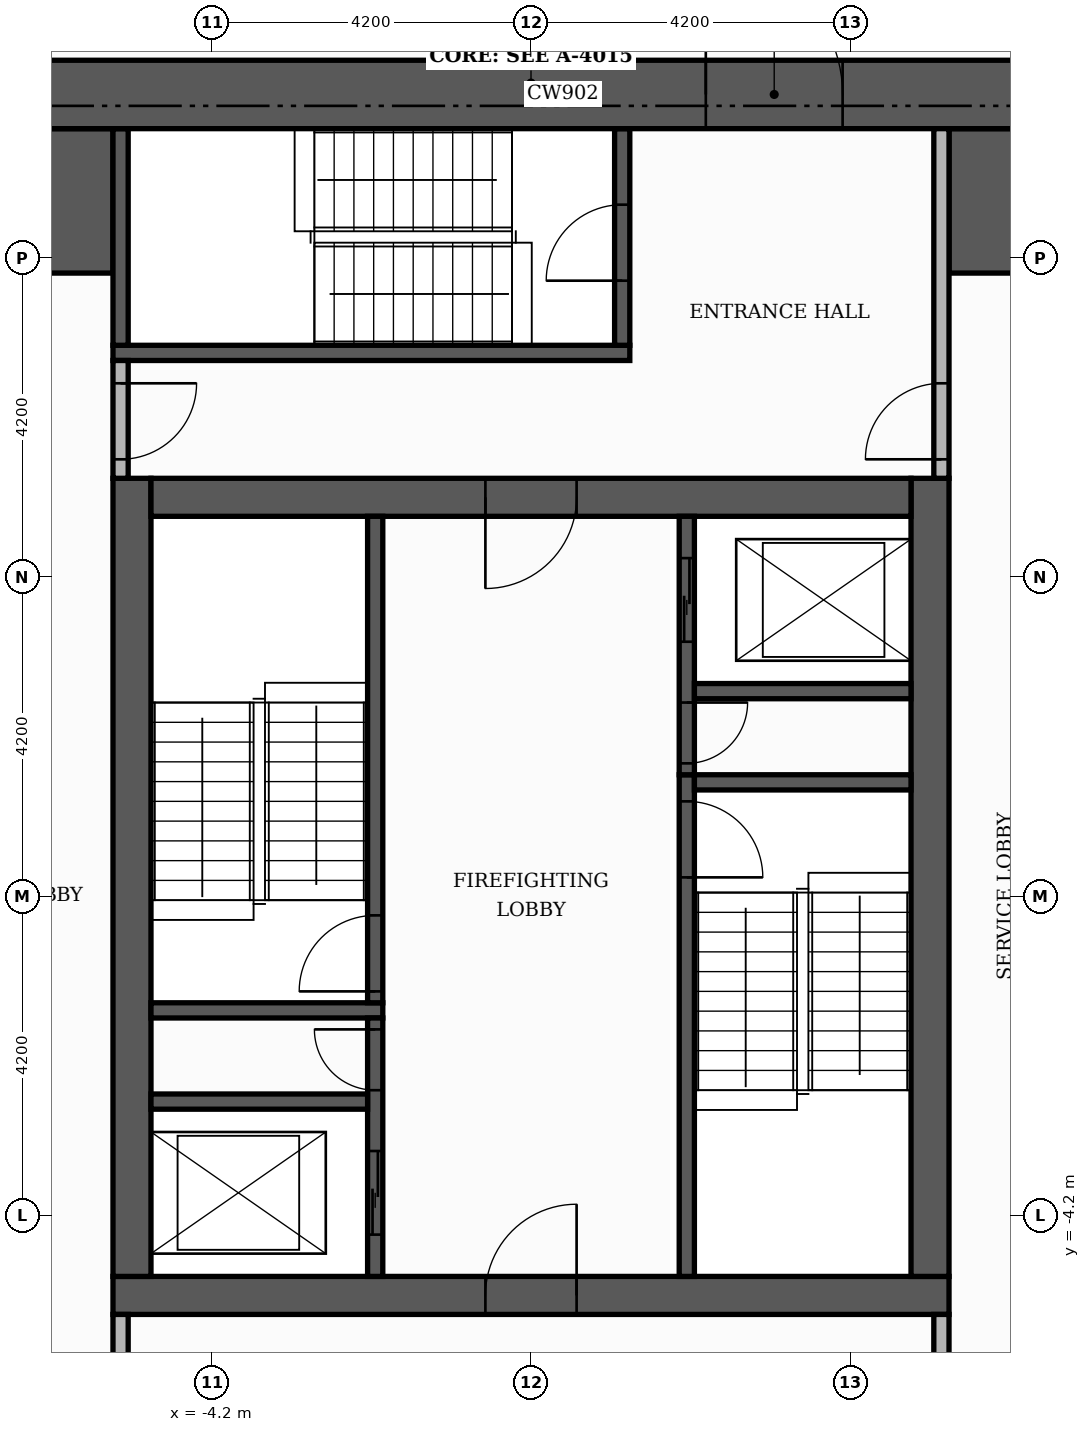
"""IFC4 building model, lengths in metres.
Left out: names, types, materials, properties, quantities, classifications, styles, units other than length and angle.
Written with IfcOpenShell. Run it as: python <this file> out.ifc"""

import sys

from ifc_helpers import new_model, si_unit, direction, frame, frame_2d, origin, place, context, subcontext, project, spatial, rectangle, extrude, element, fill, save


model = new_model("IFC4")
c1 = context("Model", 3, precision=1e-05, world=origin(), true_north=direction((0.0, 1.0)))
c2 = subcontext(c1, "Body", "Model", "MODEL_VIEW")
j1 = project(units=[si_unit("LENGTHUNIT", "METRE"), si_unit("PLANEANGLEUNIT", "RADIAN")], contexts=[c1])
p1 = place(None, origin())
s1 = spatial("IfcSite", under=j1, at=p1, CompositionType="ELEMENT")
p2 = place(p1, origin())
s2 = spatial("IfcBuilding", under=s1, at=p2, CompositionType="ELEMENT")
p3 = place(p2, frame((0.0, 0.0, 94.8)))
s3 = spatial("IfcBuildingStorey", under=s2, at=p3, CompositionType="ELEMENT", Elevation=94.8)
p4 = place(p3, frame((-5.5, -5.25, 0.0), z_axis=(0.0, 0.0, 1.0), x_axis=(1.0, 0.0, 0.0)))
e1 = element("IfcWall", 1, at=p4, inside=s3, PredefinedType="SHEAR", context=c2, shape_type="SweptSolid", body=[
    extrude(rectangle(XDim=11.0, YDim=0.5, at=frame_2d((5.5, 0.0))), origin(), (0.0, 0.0, 1.0), 3.48),
])
p5 = place(p4, frame((4.9, 0.0, 0.0)))
e2 = element("IfcOpeningElement", 2, at=p5, cuts=e1, PredefinedType="OPENING", context=c2, shape_type="SweptSolid", body=[
    extrude(rectangle(XDim=1.2, YDim=2.1, at=frame_2d((0.6, 1.05))), frame((0.0, 0.26, 0.0), z_axis=(0.0, -1.0, 0.0), x_axis=(1.0, 0.0, 0.0)), (0.0, 0.0, 1.0), 0.52),
])
for number, where, z_axis, x_axis in (
    (3, (-5.25, -5.0, 0.0), (0.0, 0.0, 1.0), (0.0, 1.0, 0.0)),
    (4, (5.25, -5.0, 0.0), (0.0, 0.0, 1.0), (0.0, 1.0, 0.0)),
):
    element("IfcWall", number, at=place(p3, frame(where, z_axis=z_axis, x_axis=x_axis)), inside=s3, PredefinedType="SHEAR", context=c2, shape_type="SweptSolid", body=[
        extrude(rectangle(XDim=10.5, YDim=0.5, at=frame_2d((5.25, 0.0))), origin(), (0.0, 0.0, 1.0), 3.48),
    ])
p6 = place(p3, frame((-5.0, 5.25, 0.0), z_axis=(0.0, 0.0, 1.0), x_axis=(1.0, 0.0, 0.0)))
e5 = element("IfcWall", 5, at=p6, inside=s3, PredefinedType="SHEAR", context=c2, shape_type="SweptSolid", body=[
    extrude(rectangle(XDim=10.0, YDim=0.5, at=frame_2d((5.0, 0.0))), origin(), (0.0, 0.0, 1.0), 3.48),
])
p7 = place(p6, frame((4.4, 0.0, 0.0)))
e6 = element("IfcOpeningElement", 6, at=p7, cuts=e5, PredefinedType="OPENING", context=c2, shape_type="SweptSolid", body=[
    extrude(rectangle(XDim=1.2, YDim=2.1, at=frame_2d((0.6, 1.05))), frame((0.0, 0.26, 0.0), z_axis=(0.0, -1.0, 0.0), x_axis=(1.0, 0.0, 0.0)), (0.0, 0.0, 1.0), 0.52),
])
for number, where, z_axis, x_axis in (
    (7, (-10.1, 9.15, 0.0), (0.0, 0.0, 1.0), (1.0, 0.0, 0.0)),
    (8, (5.5, 9.15, 0.0), (0.0, 0.0, 1.0), (1.0, 0.0, 0.0)),
):
    element("IfcWall", number, at=place(p3, frame(where, z_axis=z_axis, x_axis=x_axis)), inside=s3, PredefinedType="SHEAR", context=c2, shape_type="SweptSolid", body=[
        extrude(rectangle(XDim=4.6, YDim=1.9, at=frame_2d((2.3, 0.0))), origin(), (0.0, 0.0, 1.0), 3.48),
    ])
p8 = place(p3, frame((2.05, -5.0, 0.0), z_axis=(0.0, 0.0, 1.0), x_axis=(0.0, 1.0, 0.0)))
e9 = element("IfcWall", 9, at=p8, inside=s3, PredefinedType="SHEAR", context=c2, shape_type="SweptSolid", body=[
    extrude(rectangle(XDim=6.6, YDim=0.2, at=frame_2d((3.3, 0.0))), origin(), (0.0, 0.0, 1.0), 3.48),
])
p9 = place(p8, frame((5.25, 0.0, 0.0)))
e10 = element("IfcOpeningElement", 10, at=p9, cuts=e9, PredefinedType="OPENING", context=c2, shape_type="SweptSolid", body=[
    extrude(rectangle(XDim=1.0, YDim=2.1, at=frame_2d((0.5, 1.05))), frame((0.0, 0.11, 0.0), z_axis=(0.0, -1.0, 0.0), x_axis=(1.0, 0.0, 0.0)), (0.0, 0.0, 1.0), 0.22),
])
p10 = place(p3, frame((-5.0, -1.5, 0.0), z_axis=(0.0, 0.0, 1.0), x_axis=(1.0, 0.0, 0.0)))
e11 = element("IfcWall", 11, at=p10, inside=s3, PredefinedType="SHEAR", context=c2, shape_type="SweptSolid", body=[
    extrude(rectangle(XDim=3.05, YDim=0.2, at=frame_2d((1.525, 0.0))), origin(), (0.0, 0.0, 1.0), 3.48),
])
p11 = place(p3, frame((-2.05, -1.4, 0.0), z_axis=(0.0, 0.0, 1.0), x_axis=(0.0, 1.0, 0.0)))
e12 = element("IfcWall", 12, at=p11, inside=s3, PredefinedType="SHEAR", context=c2, shape_type="SweptSolid", body=[
    extrude(rectangle(XDim=6.4, YDim=0.2, at=frame_2d((3.2, 0.0))), origin(), (0.0, 0.0, 1.0), 3.48),
])
p12 = place(p11, frame((0.15, 0.0, 0.0)))
e13 = element("IfcOpeningElement", 13, at=p12, cuts=e12, PredefinedType="OPENING", context=c2, shape_type="SweptSolid", body=[
    extrude(rectangle(XDim=1.0, YDim=2.1, at=frame_2d((0.5, 1.05))), frame((0.0, 0.11, 0.0), z_axis=(0.0, -1.0, 0.0), x_axis=(1.0, 0.0, 0.0)), (0.0, 0.0, 1.0), 0.22),
])
p13 = place(p3, frame((2.15, 1.5, 0.0), z_axis=(0.0, 0.0, 1.0), x_axis=(1.0, 0.0, 0.0)))
e14 = element("IfcWall", 14, at=p13, inside=s3, PredefinedType="SHEAR", context=c2, shape_type="SweptSolid", body=[
    extrude(rectangle(XDim=2.85, YDim=0.2, at=frame_2d((1.425, 0.0))), origin(), (0.0, 0.0, 1.0), 3.48),
])
p14 = place(p3, frame((-5.5, 7.15, 0.0), z_axis=(0.0, 0.0, 1.0), x_axis=(1.0, 0.0, 0.0)))
e15 = element("IfcWall", 15, at=p14, inside=s3, PredefinedType="SHEAR", context=c2, shape_type="SweptSolid", body=[
    extrude(rectangle(XDim=6.8, YDim=0.2, at=frame_2d((3.4, 0.0))), origin(), (0.0, 0.0, 1.0), 3.48),
])
p15 = place(p3, frame((-5.4, 7.25, 0.0), z_axis=(0.0, 0.0, 1.0), x_axis=(0.0, 1.0, 0.0)))
e16 = element("IfcWall", 16, at=p15, inside=s3, PredefinedType="SHEAR", context=c2, shape_type="SweptSolid", body=[
    extrude(rectangle(XDim=2.85, YDim=0.2, at=frame_2d((1.425, 0.0))), origin(), (0.0, 0.0, 1.0), 3.48),
])
p16 = place(p3, frame((1.2, 7.25, 0.0), z_axis=(0.0, 0.0, 1.0), x_axis=(0.0, 1.0, 0.0)))
e17 = element("IfcWall", 17, at=p16, inside=s3, PredefinedType="SHEAR", context=c2, shape_type="SweptSolid", body=[
    extrude(rectangle(XDim=2.85, YDim=0.2, at=frame_2d((1.425, 0.0))), origin(), (0.0, 0.0, 1.0), 3.48),
])
p17 = place(p16, frame((0.85, 0.0, 0.0)))
e18 = element("IfcOpeningElement", 18, at=p17, cuts=e17, PredefinedType="OPENING", context=c2, shape_type="SweptSolid", body=[
    extrude(rectangle(XDim=1.0, YDim=2.1, at=frame_2d((0.5, 1.05))), frame((0.0, 0.11, 0.0), z_axis=(0.0, -1.0, 0.0), x_axis=(1.0, 0.0, 0.0)), (0.0, 0.0, 1.0), 0.22),
])
p18 = place(p3, frame((-2.05, -5.0, 0.0), z_axis=(0.0, 0.0, 1.0), x_axis=(0.0, 1.0, 0.0)))
e19 = element("IfcWall", 19, at=p18, inside=s3, PredefinedType="SHEAR", context=c2, shape_type="SweptSolid", body=[
    extrude(rectangle(XDim=3.4, YDim=0.2, at=frame_2d((1.7, 0.0))), origin(), (0.0, 0.0, 1.0), 3.48),
])
p19 = place(p18, frame((0.55, 0.0, 0.0)))
e20 = element("IfcOpeningElement", 20, at=p19, cuts=e19, PredefinedType="OPENING", context=c2, shape_type="SweptSolid", body=[
    extrude(rectangle(XDim=1.1, YDim=2.1, at=frame_2d((0.55, 1.05))), frame((0.0, 0.11, 0.0), z_axis=(0.0, -1.0, 0.0), x_axis=(1.0, 0.0, 0.0)), (0.0, 0.0, 1.0), 0.22),
])
p20 = place(p18, frame((2.45, 0.0, 0.0)))
e21 = element("IfcOpeningElement", 21, at=p20, cuts=e19, PredefinedType="OPENING", context=c2, shape_type="SweptSolid", body=[
    extrude(rectangle(XDim=0.8, YDim=2.1, at=frame_2d((0.4, 1.05))), frame((0.0, 0.11, 0.0), z_axis=(0.0, -1.0, 0.0), x_axis=(1.0, 0.0, 0.0)), (0.0, 0.0, 1.0), 0.22),
])
p21 = place(p3, frame((-5.0, -2.7, 0.0), z_axis=(0.0, 0.0, 1.0), x_axis=(1.0, 0.0, 0.0)))
e22 = element("IfcWall", 22, at=p21, inside=s3, PredefinedType="SHEAR", context=c2, shape_type="SweptSolid", body=[
    extrude(rectangle(XDim=2.85, YDim=0.2, at=frame_2d((1.425, 0.0))), origin(), (0.0, 0.0, 1.0), 3.48),
])
p22 = place(p3, frame((2.05, 1.6, 0.0), z_axis=(0.0, 0.0, 1.0), x_axis=(0.0, 1.0, 0.0)))
e23 = element("IfcWall", 23, at=p22, inside=s3, PredefinedType="SHEAR", context=c2, shape_type="SweptSolid", body=[
    extrude(rectangle(XDim=3.4, YDim=0.2, at=frame_2d((1.7, 0.0))), origin(), (0.0, 0.0, 1.0), 3.48),
])
p23 = place(p22, frame((1.75, 0.0, 0.0)))
e24 = element("IfcOpeningElement", 24, at=p23, cuts=e23, PredefinedType="OPENING", context=c2, shape_type="SweptSolid", body=[
    extrude(rectangle(XDim=1.1, YDim=2.1, at=frame_2d((0.55, 1.05))), frame((0.0, 0.11, 0.0), z_axis=(0.0, -1.0, 0.0), x_axis=(1.0, 0.0, 0.0)), (0.0, 0.0, 1.0), 0.22),
])
p24 = place(p22, frame((0.15, 0.0, 0.0)))
e25 = element("IfcOpeningElement", 25, at=p24, cuts=e23, PredefinedType="OPENING", context=c2, shape_type="SweptSolid", body=[
    extrude(rectangle(XDim=0.8, YDim=2.1, at=frame_2d((0.4, 1.05))), frame((0.0, 0.11, 0.0), z_axis=(0.0, -1.0, 0.0), x_axis=(1.0, 0.0, 0.0)), (0.0, 0.0, 1.0), 0.22),
])
p25 = place(p3, frame((2.15, 2.7, 0.0), z_axis=(0.0, 0.0, 1.0), x_axis=(1.0, 0.0, 0.0)))
e26 = element("IfcWall", 26, at=p25, inside=s3, PredefinedType="SHEAR", context=c2, shape_type="SweptSolid", body=[
    extrude(rectangle(XDim=2.85, YDim=0.2, at=frame_2d((1.425, 0.0))), origin(), (0.0, 0.0, 1.0), 3.48),
])
p26 = place(p3, frame((-11.0, 10.55, 0.0), z_axis=(0.0, 0.0, 1.0), x_axis=(1.0, 0.0, 0.0)))
e27 = element("IfcWall", 27, at=p26, inside=s3, PredefinedType="SHEAR", context=c2, shape_type="SweptSolid", body=[
    extrude(rectangle(XDim=22.0, YDim=0.9, at=frame_2d((11.0, 0.0))), origin(), (0.0, 0.0, 1.0), 3.48),
])
p27 = place(p26, frame((13.3, 0.0, 0.0)))
e28 = element("IfcOpeningElement", 28, at=p27, cuts=e27, PredefinedType="OPENING", context=c2, shape_type="SweptSolid", body=[
    extrude(rectangle(XDim=1.8, YDim=2.2, at=frame_2d((0.9, 1.1))), frame((0.0, 0.46, 0.0), z_axis=(0.0, -1.0, 0.0), x_axis=(1.0, 0.0, 0.0)), (0.0, 0.0, 1.0), 0.92),
])
p28 = place(p3, frame((-5.4, -10.1, 0.0), z_axis=(0.0, 0.0, 1.0), x_axis=(0.0, 1.0, 0.0)))
e29 = element("IfcWall", 29, at=p28, inside=s3, PredefinedType="PARTITIONING", context=c2, shape_type="SweptSolid", body=[
    extrude(rectangle(XDim=4.6, YDim=0.2, at=frame_2d((2.3, 0.0))), origin(), (0.0, 0.0, 1.0), 3.48),
])
p29 = place(p28, frame((2.9, 0.0, 0.0)))
e30 = element("IfcOpeningElement", 30, at=p29, cuts=e29, PredefinedType="OPENING", context=c2, shape_type="SweptSolid", body=[
    extrude(rectangle(XDim=1.0, YDim=2.1, at=frame_2d((0.5, 1.05))), frame((0.0, 0.11, 0.0), z_axis=(0.0, -1.0, 0.0), x_axis=(1.0, 0.0, 0.0)), (0.0, 0.0, 1.0), 0.22),
])
p30 = place(p3, frame((5.4, -7.9, 0.0), z_axis=(0.0, 0.0, 1.0), x_axis=(0.0, 1.0, 0.0)))
e31 = element("IfcWall", 31, at=p30, inside=s3, PredefinedType="PARTITIONING", context=c2, shape_type="SweptSolid", body=[
    extrude(rectangle(XDim=2.4, YDim=0.2, at=frame_2d((1.2, 0.0))), origin(), (0.0, 0.0, 1.0), 3.48),
])
p31 = place(p30, frame((0.7, 0.0, 0.0)))
e32 = element("IfcOpeningElement", 32, at=p31, cuts=e31, PredefinedType="OPENING", context=c2, shape_type="SweptSolid", body=[
    extrude(rectangle(XDim=1.0, YDim=2.1, at=frame_2d((0.5, 1.05))), frame((0.0, 0.11, 0.0), z_axis=(0.0, -1.0, 0.0), x_axis=(1.0, 0.0, 0.0)), (0.0, 0.0, 1.0), 0.22),
])
p32 = place(p3, frame((-5.4, 5.5, 0.0), z_axis=(0.0, 0.0, 1.0), x_axis=(0.0, 1.0, 0.0)))
e33 = element("IfcWall", 33, at=p32, inside=s3, PredefinedType="PARTITIONING", context=c2, shape_type="SweptSolid", body=[
    extrude(rectangle(XDim=1.55, YDim=0.2, at=frame_2d((0.775, 0.0))), origin(), (0.0, 0.0, 1.0), 3.48),
])
p33 = place(p32, frame((0.25, 0.0, 0.0)))
e34 = element("IfcOpeningElement", 34, at=p33, cuts=e33, PredefinedType="OPENING", context=c2, shape_type="SweptSolid", body=[
    extrude(rectangle(XDim=1.0, YDim=2.1, at=frame_2d((0.5, 1.05))), frame((0.0, 0.11, 0.0), z_axis=(0.0, -1.0, 0.0), x_axis=(1.0, 0.0, 0.0)), (0.0, 0.0, 1.0), 0.22),
])
p34 = place(p3, frame((5.4, 5.5, 0.0), z_axis=(0.0, 0.0, 1.0), x_axis=(0.0, 1.0, 0.0)))
e35 = element("IfcWall", 35, at=p34, inside=s3, PredefinedType="PARTITIONING", context=c2, shape_type="SweptSolid", body=[
    extrude(rectangle(XDim=4.6, YDim=0.2, at=frame_2d((2.3, 0.0))), origin(), (0.0, 0.0, 1.0), 3.48),
])
p35 = place(p34, frame((0.25, 0.0, 0.0)))
e36 = element("IfcOpeningElement", 36, at=p35, cuts=e35, PredefinedType="OPENING", context=c2, shape_type="SweptSolid", body=[
    extrude(rectangle(XDim=1.0, YDim=2.1, at=frame_2d((0.5, 1.05))), frame((0.0, 0.11, 0.0), z_axis=(0.0, -1.0, 0.0), x_axis=(1.0, 0.0, 0.0)), (0.0, 0.0, 1.0), 0.22),
])
p36 = place(p23, origin())
e37 = element("IfcDoor", 37, at=p36, inside=s3, OperationType="SLIDING_TO_LEFT", PredefinedType="DOOR", context=c2, shape_type="SweptSolid", body=[
    extrude(rectangle(XDim=1.1, YDim=2.1, at=frame_2d((0.55, 1.05))), frame((0.0, 0.025, 0.0), z_axis=(0.0, -1.0, 0.0), x_axis=(1.0, 0.0, 0.0)), (0.0, 0.0, 1.0), 0.05),
])
fill(e24, e37)
p37 = place(p19, origin())
e38 = element("IfcDoor", 38, at=p37, inside=s3, OperationType="SLIDING_TO_LEFT", PredefinedType="DOOR", context=c2, shape_type="SweptSolid", body=[
    extrude(rectangle(XDim=1.1, YDim=2.1, at=frame_2d((0.55, 1.05))), frame((0.0, 0.025, 0.0), z_axis=(0.0, -1.0, 0.0), x_axis=(1.0, 0.0, 0.0)), (0.0, 0.0, 1.0), 0.05),
])
fill(e20, e38)
p38 = place(p12, origin())
e39 = element("IfcDoor", 39, at=p38, inside=s3, OperationType="SINGLE_SWING_LEFT", PredefinedType="DOOR", context=c2, shape_type="SweptSolid", body=[
    extrude(rectangle(XDim=1.0, YDim=2.1, at=frame_2d((0.5, 1.05))), frame((0.0, 0.025, 0.0), z_axis=(0.0, -1.0, 0.0), x_axis=(1.0, 0.0, 0.0)), (0.0, 0.0, 1.0), 0.05),
])
fill(e13, e39)
p39 = place(p9, frame((1.0, 0.0, 0.0), z_axis=(0.0, 0.0, 1.0), x_axis=(-1.0, 0.0, 0.0)))
e40 = element("IfcDoor", 40, at=p39, inside=s3, OperationType="SINGLE_SWING_LEFT", PredefinedType="DOOR", context=c2, shape_type="SweptSolid", body=[
    extrude(rectangle(XDim=1.0, YDim=2.1, at=frame_2d((0.5, 1.05))), frame((0.0, 0.025, 0.0), z_axis=(0.0, -1.0, 0.0), x_axis=(1.0, 0.0, 0.0)), (0.0, 0.0, 1.0), 0.05),
])
fill(e10, e40)
p40 = place(p24, frame((0.8, 0.0, 0.0), z_axis=(0.0, 0.0, 1.0), x_axis=(-1.0, 0.0, 0.0)))
e41 = element("IfcDoor", 41, at=p40, inside=s3, OperationType="SINGLE_SWING_RIGHT", PredefinedType="DOOR", context=c2, shape_type="SweptSolid", body=[
    extrude(rectangle(XDim=0.8, YDim=2.1, at=frame_2d((0.4, 1.05))), frame((0.0, 0.025, 0.0), z_axis=(0.0, -1.0, 0.0), x_axis=(1.0, 0.0, 0.0)), (0.0, 0.0, 1.0), 0.05),
])
fill(e25, e41)
p41 = place(p20, origin())
e42 = element("IfcDoor", 42, at=p41, inside=s3, OperationType="SINGLE_SWING_RIGHT", PredefinedType="DOOR", context=c2, shape_type="SweptSolid", body=[
    extrude(rectangle(XDim=0.8, YDim=2.1, at=frame_2d((0.4, 1.05))), frame((0.0, 0.025, 0.0), z_axis=(0.0, -1.0, 0.0), x_axis=(1.0, 0.0, 0.0)), (0.0, 0.0, 1.0), 0.05),
])
fill(e21, e42)
p42 = place(p7, frame((1.2, 0.0, 0.0), z_axis=(0.0, 0.0, 1.0), x_axis=(-1.0, 0.0, 0.0)))
e43 = element("IfcDoor", 43, at=p42, inside=s3, OperationType="SINGLE_SWING_LEFT", PredefinedType="DOOR", context=c2, shape_type="SweptSolid", body=[
    extrude(rectangle(XDim=1.2, YDim=2.1, at=frame_2d((0.6, 1.05))), frame((0.0, 0.025, 0.0), z_axis=(0.0, -1.0, 0.0), x_axis=(1.0, 0.0, 0.0)), (0.0, 0.0, 1.0), 0.05),
])
fill(e6, e43)
p43 = place(p5, origin())
e44 = element("IfcDoor", 44, at=p43, inside=s3, OperationType="SINGLE_SWING_RIGHT", PredefinedType="DOOR", context=c2, shape_type="SweptSolid", body=[
    extrude(rectangle(XDim=1.2, YDim=2.1, at=frame_2d((0.6, 1.05))), frame((0.0, 0.025, 0.0), z_axis=(0.0, -1.0, 0.0), x_axis=(1.0, 0.0, 0.0)), (0.0, 0.0, 1.0), 0.05),
])
fill(e2, e44)
p44 = place(p17, origin())
e45 = element("IfcDoor", 45, at=p44, inside=s3, OperationType="SINGLE_SWING_LEFT", PredefinedType="DOOR", context=c2, shape_type="SweptSolid", body=[
    extrude(rectangle(XDim=1.0, YDim=2.1, at=frame_2d((0.5, 1.05))), frame((0.0, 0.025, 0.0), z_axis=(0.0, -1.0, 0.0), x_axis=(1.0, 0.0, 0.0)), (0.0, 0.0, 1.0), 0.05),
])
fill(e18, e45)
p45 = place(p33, frame((1.0, 0.0, 0.0), z_axis=(0.0, 0.0, 1.0), x_axis=(-1.0, 0.0, 0.0)))
e46 = element("IfcDoor", 46, at=p45, inside=s3, OperationType="SINGLE_SWING_RIGHT", PredefinedType="DOOR", context=c2, shape_type="SweptSolid", body=[
    extrude(rectangle(XDim=1.0, YDim=2.1, at=frame_2d((0.5, 1.05))), frame((0.0, 0.025, 0.0), z_axis=(0.0, -1.0, 0.0), x_axis=(1.0, 0.0, 0.0)), (0.0, 0.0, 1.0), 0.05),
])
fill(e34, e46)
p46 = place(p35, origin())
e47 = element("IfcDoor", 47, at=p46, inside=s3, OperationType="SINGLE_SWING_LEFT", PredefinedType="DOOR", context=c2, shape_type="SweptSolid", body=[
    extrude(rectangle(XDim=1.0, YDim=2.1, at=frame_2d((0.5, 1.05))), frame((0.0, 0.025, 0.0), z_axis=(0.0, -1.0, 0.0), x_axis=(1.0, 0.0, 0.0)), (0.0, 0.0, 1.0), 0.05),
])
fill(e36, e47)
p47 = place(p27, origin())
e48 = element("IfcDoor", 48, at=p47, inside=s3, OperationType="DOUBLE_DOOR_SINGLE_SWING", PredefinedType="DOOR", context=c2, shape_type="SweptSolid", body=[
    extrude(rectangle(XDim=1.8, YDim=2.2, at=frame_2d((0.9, 1.1))), frame((0.0, 0.025, 0.0), z_axis=(0.0, -1.0, 0.0), x_axis=(1.0, 0.0, 0.0)), (0.0, 0.0, 1.0), 0.05),
])
fill(e28, e48)
save(model, sys.argv[1])
